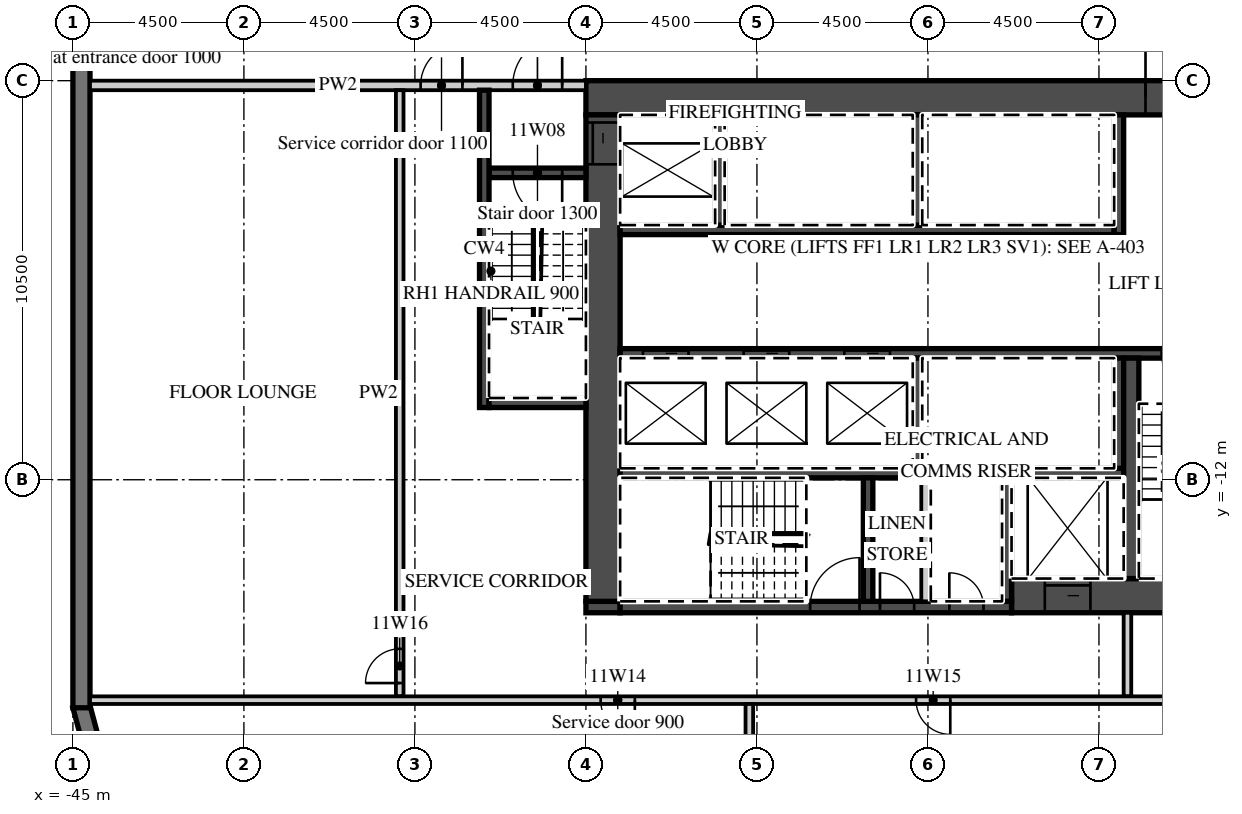
"""IFC4 building model, lengths in metres.
Left out: names, types, materials, properties, quantities, classifications, styles, units other than length and angle.
Written with IfcOpenShell. Run it as: python <this file> out.ifc"""

import sys

from ifc_helpers import new_model, si_unit, direction, frame, frame_2d, origin, place, context, subcontext, project, spatial, polyline, rectangle, outline, extrude, element, fill, save


model = new_model("IFC4")
c1 = context("Model", 3, precision=1e-05, world=origin(), true_north=direction((0.0, 1.0)))
c2 = subcontext(c1, "Body", "Model", "MODEL_VIEW")
j1 = project(units=[si_unit("LENGTHUNIT", "METRE"), si_unit("PLANEANGLEUNIT", "RADIAN")], contexts=[c1])
p1 = place(None, origin())
s1 = spatial("IfcSite", under=j1, at=p1, CompositionType="ELEMENT")
p2 = place(p1, origin())
s2 = spatial("IfcBuilding", under=s1, at=p2, CompositionType="ELEMENT")
p3 = place(p2, frame((0.0, 0.0, 66.6)))
s3 = spatial("IfcBuildingStorey", under=s2, at=p3, CompositionType="ELEMENT", Elevation=66.6)
p4 = place(p3, frame((-44.783, -17.942, 0.0), z_axis=(0.0, 0.0, 1.0), x_axis=(0.25881466832, -0.965926999034, 0.0)))
e1 = element("IfcWall", 1, at=p4, inside=s3, PredefinedType="SOLIDWALL", context=c2, shape_type="SweptSolid", body=[
    extrude(outline(polyline([(0.0, -0.225), (2.071, -0.225), (1.95, 0.225), (0.121, 0.225), (0.0, -0.225)])), origin(), (0.0, 0.0, 1.0), 3.02),
])
p5 = place(p3, frame((-44.775, 18.0, 0.0), z_axis=(0.0, 0.0, 1.0), x_axis=(0.0, -1.0, 0.0)))
e2 = element("IfcWall", 2, at=p5, inside=s3, PredefinedType="SOLIDWALL", context=c2, shape_type="SweptSolid", body=[
    extrude(rectangle(XDim=36.0, YDim=0.45, at=frame_2d((18.0, 0.0))), origin(), (0.0, 0.0, 1.0), 3.02),
])
p6 = place(p5, frame((3.9, 0.0, 0.45)))
e3 = element("IfcOpeningElement", 3, at=p6, cuts=e2, PredefinedType="OPENING", context=c2, shape_type="SweptSolid", body=[
    extrude(rectangle(XDim=3.3, YDim=2.25, at=frame_2d((1.65, 1.125))), frame((0.0, 0.235, 0.0), z_axis=(0.0, -1.0, 0.0), x_axis=(1.0, 0.0, 0.0)), (0.0, 0.0, 1.0), 0.47),
])
p7 = place(p5, frame((8.4, 0.0, 0.45)))
e4 = element("IfcOpeningElement", 4, at=p7, cuts=e2, PredefinedType="OPENING", context=c2, shape_type="SweptSolid", body=[
    extrude(rectangle(XDim=3.3, YDim=2.25, at=frame_2d((1.65, 1.125))), frame((0.0, 0.235, 0.0), z_axis=(0.0, -1.0, 0.0), x_axis=(1.0, 0.0, 0.0)), (0.0, 0.0, 1.0), 0.47),
])
p8 = place(p5, frame((12.9, 0.0, 0.45)))
e5 = element("IfcOpeningElement", 5, at=p8, cuts=e2, PredefinedType="OPENING", context=c2, shape_type="SweptSolid", body=[
    extrude(rectangle(XDim=3.3, YDim=2.25, at=frame_2d((1.65, 1.125))), frame((0.0, 0.235, 0.0), z_axis=(0.0, -1.0, 0.0), x_axis=(1.0, 0.0, 0.0)), (0.0, 0.0, 1.0), 0.47),
])
p9 = place(p3, frame((-31.5, -1.95, 0.0), z_axis=(0.0, 0.0, 1.0), x_axis=(1.0, 0.0, 0.0)))
e6 = element("IfcWall", 6, at=p9, inside=s3, PredefinedType="SHEAR", context=c2, shape_type="SweptSolid", body=[
    extrude(rectangle(XDim=18.0, YDim=0.9, at=frame_2d((9.0, 0.0))), origin(), (0.0, 0.0, 1.0), 3.02),
])
p10 = place(p9, frame((14.725, 0.0, 0.0)))
e7 = element("IfcOpeningElement", 7, at=p10, cuts=e6, PredefinedType="OPENING", context=c2, shape_type="SweptSolid", body=[
    extrude(rectangle(XDim=1.8, YDim=2.1, at=frame_2d((0.9, 1.05))), frame((0.0, 0.46, 0.0), z_axis=(0.0, -1.0, 0.0), x_axis=(1.0, 0.0, 0.0)), (0.0, 0.0, 1.0), 0.92),
])
p11 = place(p3, frame((-20.3, -15.05, 0.0), z_axis=(0.0, 0.0, 1.0), x_axis=(1.0, 0.0, 0.0)))
e8 = element("IfcWall", 8, at=p11, inside=s3, PredefinedType="SHEAR", context=c2, shape_type="SweptSolid", body=[
    extrude(rectangle(XDim=6.8, YDim=0.9, at=frame_2d((3.4, 0.0))), origin(), (0.0, 0.0, 1.0), 3.02),
])
p12 = place(p11, frame((0.875, 0.0, 0.0)))
e9 = element("IfcOpeningElement", 9, at=p12, cuts=e8, PredefinedType="OPENING", context=c2, shape_type="SweptSolid", body=[
    extrude(rectangle(XDim=1.2, YDim=2.1, at=frame_2d((0.6, 1.05))), frame((0.0, 0.46, 0.0), z_axis=(0.0, -1.0, 0.0), x_axis=(1.0, 0.0, 0.0)), (0.0, 0.0, 1.0), 0.92),
])
p13 = place(p3, frame((-31.5, -15.35, 0.0), z_axis=(0.0, 0.0, 1.0), x_axis=(1.0, 0.0, 0.0)))
e10 = element("IfcWall", 10, at=p13, inside=s3, PredefinedType="SHEAR", context=c2, shape_type="SweptSolid", body=[
    extrude(rectangle(XDim=0.9, YDim=0.3, at=frame_2d((0.45, 0.0))), origin(), (0.0, 0.0, 1.0), 3.02),
])
p14 = place(p3, frame((-30.6, -15.35, 0.0), z_axis=(0.0, 0.0, 1.0), x_axis=(1.0, 0.0, 0.0)))
e11 = element("IfcWall", 11, at=p14, inside=s3, PredefinedType="SHEAR", context=c2, shape_type="SweptSolid", body=[
    extrude(rectangle(XDim=10.3, YDim=0.3, at=frame_2d((5.15, 0.0))), origin(), (0.0, 0.0, 1.0), 3.02),
])
p15 = place(p14, frame((5.0, 0.0, 0.0)))
e12 = element("IfcOpeningElement", 12, at=p15, cuts=e11, PredefinedType="OPENING", context=c2, shape_type="SweptSolid", body=[
    extrude(rectangle(XDim=1.3, YDim=2.1, at=frame_2d((0.65, 1.05))), frame((0.0, 0.16, 0.0), z_axis=(0.0, -1.0, 0.0), x_axis=(1.0, 0.0, 0.0)), (0.0, 0.0, 1.0), 0.32),
])
p16 = place(p14, frame((6.837, 0.0, 0.0)))
e13 = element("IfcOpeningElement", 13, at=p16, cuts=e11, PredefinedType="OPENING", context=c2, shape_type="SweptSolid", body=[
    extrude(rectangle(XDim=0.9, YDim=2.1, at=frame_2d((0.45, 1.05))), frame((0.0, 0.16, 0.0), z_axis=(0.0, -1.0, 0.0), x_axis=(1.0, 0.0, 0.0)), (0.0, 0.0, 1.0), 0.32),
])
p17 = place(p14, frame((8.663, 0.0, 0.0)))
e14 = element("IfcOpeningElement", 14, at=p17, cuts=e11, PredefinedType="OPENING", context=c2, shape_type="SweptSolid", body=[
    extrude(rectangle(XDim=0.9, YDim=2.1, at=frame_2d((0.45, 1.05))), frame((0.0, 0.16, 0.0), z_axis=(0.0, -1.0, 0.0), x_axis=(1.0, 0.0, 0.0)), (0.0, 0.0, 1.0), 0.32),
])
p18 = place(p3, frame((-31.05, -15.2, 0.0), z_axis=(0.0, 0.0, 1.0), x_axis=(0.0, 1.0, 0.0)))
e15 = element("IfcWall", 15, at=p18, inside=s3, PredefinedType="SHEAR", context=c2, shape_type="SweptSolid", body=[
    extrude(rectangle(XDim=12.8, YDim=0.9, at=frame_2d((6.4, 0.0))), origin(), (0.0, 0.0, 1.0), 3.02),
])
p19 = place(p18, frame((11.5, 0.0, 0.0)))
e16 = element("IfcOpeningElement", 16, at=p19, cuts=e15, PredefinedType="OPENING", context=c2, shape_type="SweptSolid", body=[
    extrude(rectangle(XDim=1.1, YDim=2.1, at=frame_2d((0.55, 1.05))), frame((0.0, 0.46, 0.0), z_axis=(0.0, -1.0, 0.0), x_axis=(1.0, 0.0, 0.0)), (0.0, 0.0, 1.0), 0.92),
])
p20 = place(p3, frame((-30.6, -5.425, 0.0), z_axis=(0.0, 0.0, 1.0), x_axis=(1.0, 0.0, 0.0)))
e17 = element("IfcWall", 17, at=p20, inside=s3, PredefinedType="SHEAR", context=c2, shape_type="SweptSolid", body=[
    extrude(rectangle(XDim=13.0, YDim=0.25, at=frame_2d((6.5, 0.0))), origin(), (0.0, 0.0, 1.0), 3.02),
])
p21 = place(p3, frame((-17.475, -5.55, 0.0), z_axis=(0.0, 0.0, 1.0), x_axis=(0.0, 1.0, 0.0)))
e18 = element("IfcWall", 18, at=p21, inside=s3, PredefinedType="SHEAR", context=c2, shape_type="SweptSolid", body=[
    extrude(rectangle(XDim=3.15, YDim=0.25, at=frame_2d((1.575, 0.0))), origin(), (0.0, 0.0, 1.0), 3.02),
])
for number, where, z_axis, x_axis in (
    (19, (-27.975, -5.3, 0.0), (0.0, 0.0, 1.0), (0.0, 1.0, 0.0)),
    (20, (-22.775, -5.3, 0.0), (0.0, 0.0, 1.0), (0.0, 1.0, 0.0)),
):
    element("IfcWall", number, at=place(p3, frame(where, z_axis=z_axis, x_axis=x_axis)), inside=s3, PredefinedType="SHEAR", context=c2, shape_type="SweptSolid", body=[
        extrude(rectangle(XDim=2.9, YDim=0.25, at=frame_2d((1.45, 0.0))), origin(), (0.0, 0.0, 1.0), 3.02),
    ])
p22 = place(p3, frame((-30.6, -8.675, 0.0), z_axis=(0.0, 0.0, 1.0), x_axis=(1.0, 0.0, 0.0)))
e21 = element("IfcWall", 21, at=p22, inside=s3, PredefinedType="SHEAR", context=c2, shape_type="SweptSolid", body=[
    extrude(rectangle(XDim=16.2, YDim=0.25, at=frame_2d((8.1, 0.0))), origin(), (0.0, 0.0, 1.0), 3.02),
])
p23 = place(p22, frame((0.6, 0.0, 0.0)))
e22 = element("IfcOpeningElement", 22, at=p23, cuts=e21, PredefinedType="OPENING", context=c2, shape_type="SweptSolid", body=[
    extrude(rectangle(XDim=1.2, YDim=2.1, at=frame_2d((0.6, 1.05))), frame((0.0, 0.135, 0.0), z_axis=(0.0, -1.0, 0.0), x_axis=(1.0, 0.0, 0.0)), (0.0, 0.0, 1.0), 0.27),
])
p24 = place(p22, frame((3.25, 0.0, 0.0)))
e23 = element("IfcOpeningElement", 23, at=p24, cuts=e21, PredefinedType="OPENING", context=c2, shape_type="SweptSolid", body=[
    extrude(rectangle(XDim=1.2, YDim=2.1, at=frame_2d((0.6, 1.05))), frame((0.0, 0.135, 0.0), z_axis=(0.0, -1.0, 0.0), x_axis=(1.0, 0.0, 0.0)), (0.0, 0.0, 1.0), 0.27),
])
p25 = place(p22, frame((5.9, 0.0, 0.0)))
e24 = element("IfcOpeningElement", 24, at=p25, cuts=e21, PredefinedType="OPENING", context=c2, shape_type="SweptSolid", body=[
    extrude(rectangle(XDim=1.2, YDim=2.1, at=frame_2d((0.6, 1.05))), frame((0.0, 0.135, 0.0), z_axis=(0.0, -1.0, 0.0), x_axis=(1.0, 0.0, 0.0)), (0.0, 0.0, 1.0), 0.27),
])
p26 = place(p22, frame((14.25, 0.0, 0.0)))
e25 = element("IfcOpeningElement", 25, at=p26, cuts=e21, PredefinedType="OPENING", context=c2, shape_type="SweptSolid", body=[
    extrude(rectangle(XDim=1.3, YDim=2.1, at=frame_2d((0.65, 1.05))), frame((0.0, 0.135, 0.0), z_axis=(0.0, -1.0, 0.0), x_axis=(1.0, 0.0, 0.0)), (0.0, 0.0, 1.0), 0.27),
])
p27 = place(p3, frame((-30.6, -11.825, 0.0), z_axis=(0.0, 0.0, 1.0), x_axis=(1.0, 0.0, 0.0)))
e26 = element("IfcWall", 26, at=p27, inside=s3, PredefinedType="SHEAR", context=c2, shape_type="SweptSolid", body=[
    extrude(rectangle(XDim=13.25, YDim=0.25, at=frame_2d((6.625, 0.0))), origin(), (0.0, 0.0, 1.0), 3.02),
])
for number, where, z_axis, x_axis in (
    (27, (-17.475, -11.7, 0.0), (0.0, 0.0, 1.0), (0.0, 1.0, 0.0)),
    (28, (-22.775, -11.7, 0.0), (0.0, 0.0, 1.0), (0.0, 1.0, 0.0)),
):
    element("IfcWall", number, at=place(p3, frame(where, z_axis=z_axis, x_axis=x_axis)), inside=s3, PredefinedType="SHEAR", context=c2, shape_type="SweptSolid", body=[
        extrude(rectangle(XDim=2.9, YDim=0.25, at=frame_2d((1.45, 0.0))), origin(), (0.0, 0.0, 1.0), 3.02),
    ])
p28 = place(p3, frame((-17.15, -14.6, 0.0), z_axis=(0.0, 0.0, 1.0), x_axis=(0.0, 1.0, 0.0)))
e29 = element("IfcWall", 29, at=p28, inside=s3, PredefinedType="SHEAR", context=c2, shape_type="SweptSolid", body=[
    extrude(rectangle(XDim=5.8, YDim=0.4, at=frame_2d((2.9, 0.0))), origin(), (0.0, 0.0, 1.0), 3.02),
])
for number, where, z_axis, x_axis in (
    (30, (-20.425, -15.2, 0.0), (0.0, 0.0, 1.0), (0.0, 1.0, 0.0)),
    (31, (-24.075, -15.2, 0.0), (0.0, 0.0, 1.0), (0.0, 1.0, 0.0)),
):
    element("IfcWall", number, at=place(p3, frame(where, z_axis=z_axis, x_axis=x_axis)), inside=s3, PredefinedType="SHEAR", context=c2, shape_type="SweptSolid", body=[
        extrude(rectangle(XDim=3.25, YDim=0.25, at=frame_2d((1.625, 0.0))), origin(), (0.0, 0.0, 1.0), 3.02),
    ])
p29 = place(p3, frame((-22.55, -15.2, 0.0), z_axis=(0.0, 0.0, 1.0), x_axis=(0.0, 1.0, 0.0)))
e32 = element("IfcWall", 32, at=p29, inside=s3, PredefinedType="PARTITIONING", context=c2, shape_type="SweptSolid", body=[
    extrude(rectangle(XDim=3.25, YDim=0.25, at=frame_2d((1.625, 0.0))), origin(), (0.0, 0.0, 1.0), 3.02),
])
p30 = place(p3, frame((-44.55, -1.625, 0.0), z_axis=(0.0, 0.0, 1.0), x_axis=(1.0, 0.0, 0.0)))
e33 = element("IfcWall", 33, at=p30, inside=s3, PredefinedType="PARTITIONING", context=c2, shape_type="SweptSolid", body=[
    extrude(rectangle(XDim=13.05, YDim=0.25, at=frame_2d((6.525, 0.0))), origin(), (0.0, 0.0, 1.0), 3.02),
])
p31 = place(p30, frame((11.125, 0.0, 0.0)))
e34 = element("IfcOpeningElement", 34, at=p31, cuts=e33, PredefinedType="OPENING", context=c2, shape_type="SweptSolid", body=[
    extrude(rectangle(XDim=1.3, YDim=2.1, at=frame_2d((0.65, 1.05))), frame((0.0, 0.135, 0.0), z_axis=(0.0, -1.0, 0.0), x_axis=(1.0, 0.0, 0.0)), (0.0, 0.0, 1.0), 0.27),
])
p32 = place(p30, frame((8.7, 0.0, 0.0)))
e35 = element("IfcOpeningElement", 35, at=p32, cuts=e33, PredefinedType="OPENING", context=c2, shape_type="SweptSolid", body=[
    extrude(rectangle(XDim=1.1, YDim=2.1, at=frame_2d((0.55, 1.05))), frame((0.0, 0.135, 0.0), z_axis=(0.0, -1.0, 0.0), x_axis=(1.0, 0.0, 0.0)), (0.0, 0.0, 1.0), 0.27),
])
p33 = place(p3, frame((-34.05, -3.925, 0.0), z_axis=(0.0, 0.0, 1.0), x_axis=(1.0, 0.0, 0.0)))
e36 = element("IfcWall", 36, at=p33, inside=s3, PredefinedType="SHEAR", context=c2, shape_type="SweptSolid", body=[
    extrude(rectangle(XDim=2.55, YDim=0.25, at=frame_2d((1.275, 0.0))), origin(), (0.0, 0.0, 1.0), 3.02),
])
p34 = place(p33, frame((0.625, 0.0, 0.0)))
e37 = element("IfcOpeningElement", 37, at=p34, cuts=e36, PredefinedType="OPENING", context=c2, shape_type="SweptSolid", body=[
    extrude(rectangle(XDim=1.3, YDim=2.1, at=frame_2d((0.65, 1.05))), frame((0.0, 0.135, 0.0), z_axis=(0.0, -1.0, 0.0), x_axis=(1.0, 0.0, 0.0)), (0.0, 0.0, 1.0), 0.27),
])
p35 = place(p3, frame((-34.175, -10.1, 0.0), z_axis=(0.0, 0.0, 1.0), x_axis=(0.0, 1.0, 0.0)))
e38 = element("IfcWall", 38, at=p35, inside=s3, PredefinedType="SHEAR", context=c2, shape_type="SweptSolid", body=[
    extrude(rectangle(XDim=8.35, YDim=0.25, at=frame_2d((4.175, 0.0))), origin(), (0.0, 0.0, 1.0), 3.02),
])
p36 = place(p3, frame((-34.05, -9.975, 0.0), z_axis=(0.0, 0.0, 1.0), x_axis=(1.0, 0.0, 0.0)))
e39 = element("IfcWall", 39, at=p36, inside=s3, PredefinedType="SHEAR", context=c2, shape_type="SweptSolid", body=[
    extrude(rectangle(XDim=2.55, YDim=0.25, at=frame_2d((1.275, 0.0))), origin(), (0.0, 0.0, 1.0), 3.02),
])
p37 = place(p3, frame((-17.25, -17.7, 0.0), z_axis=(0.0, 0.0, 1.0), x_axis=(0.0, 1.0, 0.0)))
e40 = element("IfcWall", 40, at=p37, inside=s3, PredefinedType="PARTITIONING", context=c2, shape_type="SweptSolid", body=[
    extrude(rectangle(XDim=2.2, YDim=0.2, at=frame_2d((1.1, 0.0))), origin(), (0.0, 0.0, 1.0), 3.02),
])
p38 = place(p3, frame((-36.4, -17.7, 0.0), z_axis=(0.0, 0.0, 1.0), x_axis=(0.0, 1.0, 0.0)))
e41 = element("IfcWall", 41, at=p38, inside=s3, PredefinedType="PARTITIONING", context=c2, shape_type="SweptSolid", body=[
    extrude(rectangle(XDim=15.95, YDim=0.2, at=frame_2d((7.975, 0.0))), origin(), (0.0, 0.0, 1.0), 3.02),
])
p39 = place(p38, frame((0.35, 0.0, 0.0)))
e42 = element("IfcOpeningElement", 42, at=p39, cuts=e41, PredefinedType="OPENING", context=c2, shape_type="SweptSolid", body=[
    extrude(rectangle(XDim=0.9, YDim=2.1, at=frame_2d((0.45, 1.05))), frame((0.0, 0.11, 0.0), z_axis=(0.0, -1.0, 0.0), x_axis=(1.0, 0.0, 0.0)), (0.0, 0.0, 1.0), 0.22),
])
p40 = place(p3, frame((-44.55, -17.8, 0.0), z_axis=(0.0, 0.0, 1.0), x_axis=(1.0, 0.0, 0.0)))
e43 = element("IfcWall", 43, at=p40, inside=s3, PredefinedType="PARTITIONING", context=c2, shape_type="SweptSolid", body=[
    extrude(rectangle(XDim=30.95, YDim=0.2, at=frame_2d((15.475, 0.0))), origin(), (0.0, 0.0, 1.0), 3.02),
])
p41 = place(p40, frame((13.438, 0.0, 0.0)))
e44 = element("IfcOpeningElement", 44, at=p41, cuts=e43, PredefinedType="OPENING", context=c2, shape_type="SweptSolid", body=[
    extrude(rectangle(XDim=0.9, YDim=2.1, at=frame_2d((0.45, 1.05))), frame((0.0, 0.11, 0.0), z_axis=(0.0, -1.0, 0.0), x_axis=(1.0, 0.0, 0.0)), (0.0, 0.0, 1.0), 0.22),
])
p42 = place(p40, frame((21.738, 0.0, 0.0)))
e45 = element("IfcOpeningElement", 45, at=p42, cuts=e43, PredefinedType="OPENING", context=c2, shape_type="SweptSolid", body=[
    extrude(rectangle(XDim=0.9, YDim=2.1, at=frame_2d((0.45, 1.05))), frame((0.0, 0.11, 0.0), z_axis=(0.0, -1.0, 0.0), x_axis=(1.0, 0.0, 0.0)), (0.0, 0.0, 1.0), 0.22),
])
p43 = place(p3, frame((-27.2, -21.55, 0.0), z_axis=(0.0, 0.0, 1.0), x_axis=(0.0, 1.0, 0.0)))
e46 = element("IfcWall", 46, at=p43, inside=s3, PredefinedType="PARTITIONING", context=c2, shape_type="SweptSolid", body=[
    extrude(rectangle(XDim=3.65, YDim=0.2, at=frame_2d((1.825, 0.0))), origin(), (0.0, 0.0, 1.0), 3.02),
])
p44 = place(p23, origin())
e47 = element("IfcDoor", 47, at=p44, inside=s3, OperationType="SLIDING_TO_LEFT", PredefinedType="DOOR", context=c2, shape_type="SweptSolid", body=[
    extrude(rectangle(XDim=1.2, YDim=2.1, at=frame_2d((0.6, 1.05))), frame((0.0, 0.025, 0.0), z_axis=(0.0, -1.0, 0.0), x_axis=(1.0, 0.0, 0.0)), (0.0, 0.0, 1.0), 0.05),
])
fill(e22, e47)
p45 = place(p24, origin())
e48 = element("IfcDoor", 48, at=p45, inside=s3, OperationType="SLIDING_TO_RIGHT", PredefinedType="DOOR", context=c2, shape_type="SweptSolid", body=[
    extrude(rectangle(XDim=1.2, YDim=2.1, at=frame_2d((0.6, 1.05))), frame((0.0, 0.025, 0.0), z_axis=(0.0, -1.0, 0.0), x_axis=(1.0, 0.0, 0.0)), (0.0, 0.0, 1.0), 0.05),
])
fill(e23, e48)
p46 = place(p25, origin())
e49 = element("IfcDoor", 49, at=p46, inside=s3, OperationType="SLIDING_TO_RIGHT", PredefinedType="DOOR", context=c2, shape_type="SweptSolid", body=[
    extrude(rectangle(XDim=1.2, YDim=2.1, at=frame_2d((0.6, 1.05))), frame((0.0, 0.025, 0.0), z_axis=(0.0, -1.0, 0.0), x_axis=(1.0, 0.0, 0.0)), (0.0, 0.0, 1.0), 0.05),
])
fill(e24, e49)
p47 = place(p12, origin())
e50 = element("IfcDoor", 50, at=p47, inside=s3, OperationType="SLIDING_TO_LEFT", PredefinedType="DOOR", context=c2, shape_type="SweptSolid", body=[
    extrude(rectangle(XDim=1.2, YDim=2.1, at=frame_2d((0.6, 1.05))), frame((0.0, 0.025, 0.0), z_axis=(0.0, -1.0, 0.0), x_axis=(1.0, 0.0, 0.0)), (0.0, 0.0, 1.0), 0.05),
])
fill(e9, e50)
p48 = place(p19, origin())
e51 = element("IfcDoor", 51, at=p48, inside=s3, OperationType="SLIDING_TO_RIGHT", PredefinedType="DOOR", context=c2, shape_type="SweptSolid", body=[
    extrude(rectangle(XDim=1.1, YDim=2.1, at=frame_2d((0.55, 1.05))), frame((0.0, 0.025, 0.0), z_axis=(0.0, -1.0, 0.0), x_axis=(1.0, 0.0, 0.0)), (0.0, 0.0, 1.0), 0.05),
])
fill(e16, e51)
p49 = place(p10, origin())
e52 = element("IfcDoor", 52, at=p49, inside=s3, OperationType="DOUBLE_DOOR_DOUBLE_SWING", PredefinedType="DOOR", context=c2, shape_type="SweptSolid", body=[
    extrude(rectangle(XDim=1.8, YDim=2.1, at=frame_2d((0.9, 1.05))), frame((0.0, 0.025, 0.0), z_axis=(0.0, -1.0, 0.0), x_axis=(1.0, 0.0, 0.0)), (0.0, 0.0, 1.0), 0.05),
])
fill(e7, e52)
p50 = place(p31, origin())
e53 = element("IfcDoor", 53, at=p50, inside=s3, OperationType="SINGLE_SWING_RIGHT", PredefinedType="DOOR", context=c2, shape_type="SweptSolid", body=[
    extrude(rectangle(XDim=1.3, YDim=2.1, at=frame_2d((0.65, 1.05))), frame((0.0, 0.025, 0.0), z_axis=(0.0, -1.0, 0.0), x_axis=(1.0, 0.0, 0.0)), (0.0, 0.0, 1.0), 0.05),
])
fill(e34, e53)
p51 = place(p34, origin())
e54 = element("IfcDoor", 54, at=p51, inside=s3, OperationType="SINGLE_SWING_RIGHT", PredefinedType="DOOR", context=c2, shape_type="SweptSolid", body=[
    extrude(rectangle(XDim=1.3, YDim=2.1, at=frame_2d((0.65, 1.05))), frame((0.0, 0.025, 0.0), z_axis=(0.0, -1.0, 0.0), x_axis=(1.0, 0.0, 0.0)), (0.0, 0.0, 1.0), 0.05),
])
fill(e37, e54)
p52 = place(p32, origin())
e55 = element("IfcDoor", 55, at=p52, inside=s3, OperationType="SINGLE_SWING_RIGHT", PredefinedType="DOOR", context=c2, shape_type="SweptSolid", body=[
    extrude(rectangle(XDim=1.1, YDim=2.1, at=frame_2d((0.55, 1.05))), frame((0.0, 0.025, 0.0), z_axis=(0.0, -1.0, 0.0), x_axis=(1.0, 0.0, 0.0)), (0.0, 0.0, 1.0), 0.05),
])
fill(e35, e55)
p53 = place(p26, origin())
e56 = element("IfcDoor", 56, at=p53, inside=s3, OperationType="SINGLE_SWING_RIGHT", PredefinedType="DOOR", context=c2, shape_type="SweptSolid", body=[
    extrude(rectangle(XDim=1.3, YDim=2.1, at=frame_2d((0.65, 1.05))), frame((0.0, 0.025, 0.0), z_axis=(0.0, -1.0, 0.0), x_axis=(1.0, 0.0, 0.0)), (0.0, 0.0, 1.0), 0.05),
])
fill(e25, e56)
p54 = place(p15, origin())
e57 = element("IfcDoor", 57, at=p54, inside=s3, OperationType="SINGLE_SWING_RIGHT", PredefinedType="DOOR", context=c2, shape_type="SweptSolid", body=[
    extrude(rectangle(XDim=1.3, YDim=2.1, at=frame_2d((0.65, 1.05))), frame((0.0, 0.025, 0.0), z_axis=(0.0, -1.0, 0.0), x_axis=(1.0, 0.0, 0.0)), (0.0, 0.0, 1.0), 0.05),
])
fill(e12, e57)
p55 = place(p16, origin())
e58 = element("IfcDoor", 58, at=p55, inside=s3, OperationType="SINGLE_SWING_LEFT", PredefinedType="DOOR", context=c2, shape_type="SweptSolid", body=[
    extrude(rectangle(XDim=0.9, YDim=2.1, at=frame_2d((0.45, 1.05))), frame((0.0, 0.025, 0.0), z_axis=(0.0, -1.0, 0.0), x_axis=(1.0, 0.0, 0.0)), (0.0, 0.0, 1.0), 0.05),
])
fill(e13, e58)
p56 = place(p17, origin())
e59 = element("IfcDoor", 59, at=p56, inside=s3, OperationType="SINGLE_SWING_LEFT", PredefinedType="DOOR", context=c2, shape_type="SweptSolid", body=[
    extrude(rectangle(XDim=0.9, YDim=2.1, at=frame_2d((0.45, 1.05))), frame((0.0, 0.025, 0.0), z_axis=(0.0, -1.0, 0.0), x_axis=(1.0, 0.0, 0.0)), (0.0, 0.0, 1.0), 0.05),
])
fill(e14, e59)
p57 = place(p41, origin())
e60 = element("IfcDoor", 60, at=p57, inside=s3, OperationType="SINGLE_SWING_RIGHT", PredefinedType="DOOR", context=c2, shape_type="SweptSolid", body=[
    extrude(rectangle(XDim=0.9, YDim=2.1, at=frame_2d((0.45, 1.05))), frame((0.0, 0.025, 0.0), z_axis=(0.0, -1.0, 0.0), x_axis=(1.0, 0.0, 0.0)), (0.0, 0.0, 1.0), 0.05),
])
fill(e44, e60)
p58 = place(p42, origin())
e61 = element("IfcDoor", 61, at=p58, inside=s3, OperationType="SINGLE_SWING_RIGHT", PredefinedType="DOOR", context=c2, shape_type="SweptSolid", body=[
    extrude(rectangle(XDim=0.9, YDim=2.1, at=frame_2d((0.45, 1.05))), frame((0.0, 0.025, 0.0), z_axis=(0.0, -1.0, 0.0), x_axis=(1.0, 0.0, 0.0)), (0.0, 0.0, 1.0), 0.05),
])
fill(e45, e61)
p59 = place(p39, origin())
e62 = element("IfcDoor", 62, at=p59, inside=s3, OperationType="SINGLE_SWING_LEFT", PredefinedType="DOOR", context=c2, shape_type="SweptSolid", body=[
    extrude(rectangle(XDim=0.9, YDim=2.1, at=frame_2d((0.45, 1.05))), frame((0.0, 0.025, 0.0), z_axis=(0.0, -1.0, 0.0), x_axis=(1.0, 0.0, 0.0)), (0.0, 0.0, 1.0), 0.05),
])
fill(e42, e62)
save(model, sys.argv[1])
